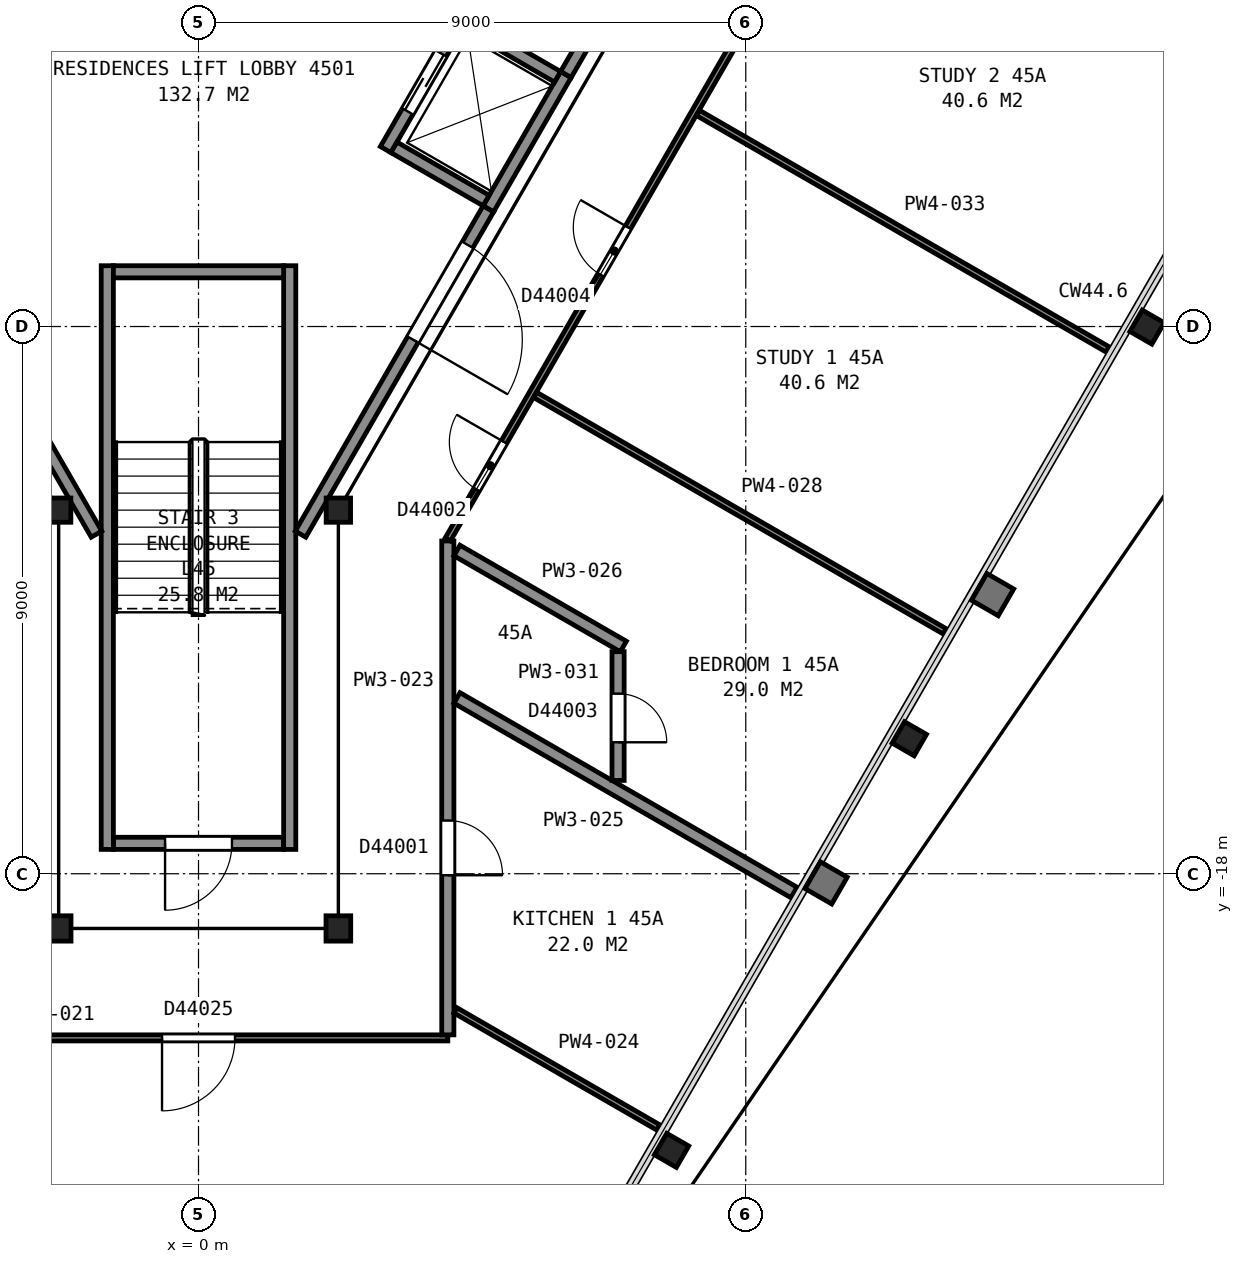
"""IFC4 building model, lengths in metres.
Left out: names, types, materials, properties, quantities, classifications, styles, units other than length and angle.
Written with IfcOpenShell. Run it as: python <this file> out.ifc"""

import sys

from ifc_helpers import new_model, si_unit, direction, frame, frame_2d, origin, origin_2d, place, context, subcontext, project, spatial, rectangle, i_section, extrude, element, fill, save


model = new_model("IFC4")
c1 = context("Model", 3, precision=1e-05, world=origin(), true_north=direction((0.0, 1.0)))
c2 = subcontext(c1, "Body", "Model", "MODEL_VIEW")
j1 = project(units=[si_unit("LENGTHUNIT", "METRE"), si_unit("PLANEANGLEUNIT", "RADIAN")], contexts=[c1])
p1 = place(None, origin())
s1 = spatial("IfcSite", under=j1, at=p1, CompositionType="ELEMENT")
p2 = place(p1, origin())
s2 = spatial("IfcBuilding", under=s1, at=p2, CompositionType="ELEMENT")
p3 = place(p2, frame((0.0, 0.0, 182.1)))
s3 = spatial("IfcBuildingStorey", under=s2, at=p3, CompositionType="ELEMENT", Elevation=182.1)
p4 = place(p3, frame((7.78, -22.55, 0.0), z_axis=(0.0, 0.0, 1.0), x_axis=(-0.5, -0.866025403784, 0.0)))
e1 = element("IfcColumn", 1, at=p4, inside=s3, PredefinedType="COLUMN", context=c2, shape_type="SweptSolid", body=[
    extrude(i_section(OverallWidth=0.406, OverallDepth=0.417, WebThickness=0.03, FlangeThickness=0.048, FilletRadius=0.015, at=origin_2d()), origin(), (0.0, 0.0, 1.0), 3.66),
])
p5 = place(p3, frame((11.69, -15.78, 0.0), z_axis=(0.0, 0.0, 1.0), x_axis=(-0.5, -0.866025403784, 0.0)))
e2 = element("IfcColumn", 2, at=p5, inside=s3, PredefinedType="COLUMN", context=c2, shape_type="SweptSolid", body=[
    extrude(i_section(OverallWidth=0.406, OverallDepth=0.417, WebThickness=0.03, FlangeThickness=0.048, FilletRadius=0.015, at=origin_2d()), origin(), (0.0, 0.0, 1.0), 3.665),
])
p6 = place(p3, frame((15.6, -9.01, 0.0), z_axis=(0.0, 0.0, 1.0), x_axis=(-0.5, -0.866025403784, 0.0)))
e3 = element("IfcColumn", 3, at=p6, inside=s3, PredefinedType="COLUMN", context=c2, shape_type="SweptSolid", body=[
    extrude(i_section(OverallWidth=0.406, OverallDepth=0.417, WebThickness=0.03, FlangeThickness=0.048, FilletRadius=0.015, at=origin_2d()), origin(), (0.0, 0.0, 1.0), 3.67),
])
p7 = place(p3, frame((-2.3, -12.02, 0.0), z_axis=(0.0, 0.0, 1.0), x_axis=(1.0, 0.0, 0.0)))
e4 = element("IfcColumn", 4, at=p7, inside=s3, PredefinedType="COLUMN", context=c2, shape_type="SweptSolid", body=[
    extrude(i_section(OverallWidth=0.401, OverallDepth=0.399, WebThickness=0.025, FlangeThickness=0.04, FilletRadius=0.015, at=origin_2d()), origin(), (0.0, 0.0, 1.0), 3.7),
])
for number, where, z_axis, x_axis in (
    (5, (-2.3, -18.9, 0.0), (0.0, 0.0, 1.0), (-1.0, 0.0, 0.0)),
    (6, (2.3, -18.9, 0.0), (0.0, 0.0, 1.0), (-1.0, 0.0, 0.0)),
):
    element("IfcColumn", number, at=place(p3, frame(where, z_axis=z_axis, x_axis=x_axis)), inside=s3, PredefinedType="COLUMN", context=c2, shape_type="SweptSolid", body=[
        extrude(i_section(OverallWidth=0.406, OverallDepth=0.417, WebThickness=0.03, FlangeThickness=0.048, FilletRadius=0.015, at=origin_2d()), origin(), (0.0, 0.0, 1.0), 3.7),
    ])
p8 = place(p3, frame((2.3, -12.02, 0.0), z_axis=(0.0, 0.0, 1.0), x_axis=(1.0, 0.0, 0.0)))
e7 = element("IfcColumn", 7, at=p8, inside=s3, PredefinedType="COLUMN", context=c2, shape_type="SweptSolid", body=[
    extrude(i_section(OverallWidth=0.401, OverallDepth=0.399, WebThickness=0.025, FlangeThickness=0.04, FilletRadius=0.015, at=origin_2d()), origin(), (0.0, 0.0, 1.0), 3.7),
])
p9 = place(p3, frame((-1.4, -17.5, 0.0), z_axis=(0.0, 0.0, 1.0), x_axis=(1.0, 0.0, 0.0)))
e8 = element("IfcWall", 8, at=p9, inside=s3, PredefinedType="PARTITIONING", context=c2, shape_type="SweptSolid", body=[
    extrude(rectangle(XDim=2.8, YDim=0.2, at=frame_2d((1.4, 0.0))), origin(), (0.0, 0.0, 1.0), 3.45),
])
p10 = place(p9, frame((0.85, 0.0, 0.0)))
e9 = element("IfcOpeningElement", 9, at=p10, cuts=e8, PredefinedType="OPENING", context=c2, shape_type="SweptSolid", body=[
    extrude(rectangle(XDim=1.1, YDim=2.1, at=frame_2d((0.55, 1.05))), frame((0.0, 0.11, 0.0), z_axis=(0.0, -1.0, 0.0), x_axis=(1.0, 0.0, 0.0)), (0.0, 0.0, 1.0), 0.22),
])
for number, where, z_axis, x_axis in (
    (10, (1.5, -8.0, 0.0), (0.0, 0.0, 1.0), (0.0, -1.0, 0.0)),
    (11, (-1.5, -8.0, 0.0), (0.0, 0.0, 1.0), (0.0, -1.0, 0.0)),
):
    element("IfcWall", number, at=place(p3, frame(where, z_axis=z_axis, x_axis=x_axis)), inside=s3, PredefinedType="PARTITIONING", context=c2, shape_type="SweptSolid", body=[
        extrude(rectangle(XDim=9.6, YDim=0.2, at=frame_2d((4.8, 0.0))), origin(), (0.0, 0.0, 1.0), 3.45),
    ])
p11 = place(p3, frame((-1.4, -8.1, 0.0), z_axis=(0.0, 0.0, 1.0), x_axis=(1.0, 0.0, 0.0)))
e12 = element("IfcWall", 12, at=p11, inside=s3, PredefinedType="PARTITIONING", context=c2, shape_type="SweptSolid", body=[
    extrude(rectangle(XDim=2.8, YDim=0.2, at=frame_2d((1.4, 0.0))), origin(), (0.0, 0.0, 1.0), 3.45),
])
p12 = place(p3, frame((4.766, -7.065, 0.0), z_axis=(0.0, 0.0, 1.0), x_axis=(0.499948979701, 0.866054858364, 0.0)))
e13 = element("IfcWall", 13, at=p12, inside=s3, PredefinedType="PARTITIONING", context=c2, shape_type="SweptSolid", body=[
    extrude(rectangle(XDim=2.55, YDim=0.2, at=frame_2d((1.275, 0.0))), origin(), (0.0, 0.0, 1.0), 3.7),
])
p13 = place(p3, frame((3.077, -6.09, 0.0), z_axis=(0.0, 0.0, 1.0), x_axis=(0.500062241894, 0.865989465428, 0.0)))
e14 = element("IfcWall", 14, at=p13, inside=s3, PredefinedType="PARTITIONING", context=c2, shape_type="SweptSolid", body=[
    extrude(rectangle(XDim=2.55, YDim=0.2, at=frame_2d((1.275, 0.0))), origin(), (0.0, 0.0, 1.0), 3.7),
])
p14 = place(p13, frame((0.725, 0.0, 0.0)))
e15 = element("IfcOpeningElement", 15, at=p14, cuts=e14, PredefinedType="OPENING", context=c2, shape_type="SweptSolid", body=[
    extrude(rectangle(XDim=1.1, YDim=2.1, at=frame_2d((0.55, 1.05))), frame((0.0, 0.11, 0.0), z_axis=(0.0, -1.0, 0.0), x_axis=(1.0, 0.0, 0.0)), (0.0, 0.0, 1.0), 0.22),
])
p15 = place(p3, frame((5.905, -4.893, 0.0), z_axis=(0.0, 0.0, 1.0), x_axis=(-0.866002029911, 0.500040482552, 0.0)))
e16 = element("IfcWall", 16, at=p15, inside=s3, PredefinedType="PARTITIONING", context=c2, shape_type="SweptSolid", body=[
    extrude(rectangle(XDim=1.75, YDim=0.2, at=frame_2d((0.875, 0.0))), origin(), (0.0, 0.0, 1.0), 3.7),
])
p16 = place(p3, frame((4.73, -6.928, 0.0), z_axis=(0.0, 0.0, 1.0), x_axis=(-0.866036909293, 0.499980071345, 0.0)))
e17 = element("IfcWall", 17, at=p16, inside=s3, PredefinedType="PARTITIONING", context=c2, shape_type="SweptSolid", body=[
    extrude(rectangle(XDim=1.75, YDim=0.2, at=frame_2d((0.875, 0.0))), origin(), (0.0, 0.0, 1.0), 3.7),
])
p17 = place(p3, frame((-4.655, -7.257, 0.0), z_axis=(0.0, 0.0, 1.0), x_axis=(0.499966124405, -0.866044960985, 0.0)))
e18 = element("IfcWall", 18, at=p17, inside=s3, PredefinedType="PARTITIONING", context=c2, shape_type="SweptSolid", body=[
    extrude(rectangle(XDim=5.956, YDim=0.2, at=frame_2d((2.978, 0.0))), origin(), (0.0, 0.0, 1.0), 3.45),
])
p18 = place(p3, frame((1.677, -12.415, 0.0), z_axis=(0.0, 0.0, 1.0), x_axis=(0.500054337157, 0.865994029939, 0.0)))
e19 = element("IfcWall", 19, at=p18, inside=s3, PredefinedType="PARTITIONING", context=c2, shape_type="SweptSolid", body=[
    extrude(rectangle(XDim=6.177, YDim=0.2, at=frame_2d((3.088, 0.0))), origin(), (0.0, 0.0, 1.0), 3.45),
])
p19 = place(p18, frame((3.695, 0.0, 0.0)))
e20 = element("IfcOpeningElement", 20, at=p19, cuts=e19, PredefinedType="OPENING", context=c2, shape_type="SweptSolid", body=[
    extrude(rectangle(XDim=1.8, YDim=2.1, at=frame_2d((0.9, 1.05))), frame((0.0, 0.11, 0.0), z_axis=(0.0, -1.0, 0.0), x_axis=(1.0, 0.0, 0.0)), (0.0, 0.0, 1.0), 0.22),
])
p20 = place(p3, frame((6.042, -4.855, 0.0), z_axis=(0.0, 0.0, 1.0), x_axis=(0.500252727967, 0.865879442048, 0.0)))
e21 = element("IfcWall", 21, at=p20, inside=s3, PredefinedType="PARTITIONING", context=c2, shape_type="SweptSolid", body=[
    extrude(rectangle(XDim=2.617, YDim=0.2, at=frame_2d((1.309, 0.0))), origin(), (0.0, 0.0, 1.0), 3.45),
])
p21 = place(p3, frame((4.1, -20.7, 0.0), z_axis=(0.0, 0.0, 1.0), x_axis=(-1.0, 0.0, 0.0)))
e22 = element("IfcWall", 22, at=p21, inside=s3, PredefinedType="PARTITIONING", context=c2, shape_type="SweptSolid", body=[
    extrude(rectangle(XDim=8.25, YDim=0.1, at=frame_2d((4.125, 0.0))), origin(), (0.0, 0.0, 1.0), 2.713),
])
p22 = place(p21, frame((3.5, 0.0, 0.0)))
e23 = element("IfcOpeningElement", 23, at=p22, cuts=e22, PredefinedType="OPENING", context=c2, shape_type="SweptSolid", body=[
    extrude(rectangle(XDim=1.2, YDim=2.1, at=frame_2d((0.6, 1.05))), frame((0.0, 0.06, 0.0), z_axis=(0.0, -1.0, 0.0), x_axis=(1.0, 0.0, 0.0)), (0.0, 0.0, 1.0), 0.12),
])
p23 = place(p3, frame((4.1, -12.527, 0.0), z_axis=(0.0, 0.0, 1.0), x_axis=(0.0, -1.0, 0.0)))
e24 = element("IfcWall", 24, at=p23, inside=s3, PredefinedType="PARTITIONING", context=c2, shape_type="SweptSolid", body=[
    extrude(rectangle(XDim=8.123, YDim=0.2, at=frame_2d((4.062, 0.0))), origin(), (0.0, 0.0, 1.0), 2.713),
])
p24 = place(p23, frame((4.598, 0.0, 0.0)))
e25 = element("IfcOpeningElement", 25, at=p24, cuts=e24, PredefinedType="OPENING", context=c2, shape_type="SweptSolid", body=[
    extrude(rectangle(XDim=0.9, YDim=2.1, at=frame_2d((0.45, 1.05))), frame((0.0, 0.11, 0.0), z_axis=(0.0, -1.0, 0.0), x_axis=(1.0, 0.0, 0.0)), (0.0, 0.0, 1.0), 0.22),
])
p25 = place(p3, frame((4.225, -20.247, 0.0), z_axis=(0.0, 0.0, 1.0), x_axis=(0.866070569679, -0.499921762215, 0.0)))
e26 = element("IfcWall", 26, at=p25, inside=s3, PredefinedType="PARTITIONING", context=c2, shape_type="SweptSolid", body=[
    extrude(rectangle(XDim=3.853, YDim=0.1, at=frame_2d((1.926, 0.0))), origin(), (0.0, 0.0, 1.0), 2.713),
])
p26 = place(p3, frame((4.25, -15.109, 0.0), z_axis=(0.0, 0.0, 1.0), x_axis=(0.866077604108, -0.499909575486, 0.0)))
e27 = element("IfcWall", 27, at=p26, inside=s3, PredefinedType="PARTITIONING", context=c2, shape_type="SweptSolid", body=[
    extrude(rectangle(XDim=6.4, YDim=0.2, at=frame_2d((3.2, 0.0))), origin(), (0.0, 0.0, 1.0), 2.713),
])
p27 = place(p3, frame((4.25, -12.684, 0.0), z_axis=(0.0, 0.0, 1.0), x_axis=(0.866109679077, -0.499854002494, 0.0)))
e28 = element("IfcWall", 28, at=p27, inside=s3, PredefinedType="PARTITIONING", context=c2, shape_type="SweptSolid", body=[
    extrude(rectangle(XDim=3.16, YDim=0.2, at=frame_2d((1.58, 0.0))), origin(), (0.0, 0.0, 1.0), 2.713),
])
p28 = place(p3, frame((12.903, 2.745, 0.0), z_axis=(0.0, 0.0, 1.0), x_axis=(-0.499997333799, -0.866026943111, 0.0)))
e29 = element("IfcWall", 29, at=p28, inside=s3, PredefinedType="PARTITIONING", context=c2, shape_type="SweptSolid", body=[
    extrude(rectangle(XDim=17.606, YDim=0.1, at=frame_2d((8.803, 0.0))), origin(), (0.0, 0.0, 1.0), 2.713),
])
p29 = place(p28, frame((15.756, 0.0, 0.0)))
e30 = element("IfcOpeningElement", 30, at=p29, cuts=e29, PredefinedType="OPENING", context=c2, shape_type="SweptSolid", body=[
    extrude(rectangle(XDim=0.9, YDim=2.1, at=frame_2d((0.45, 1.05))), frame((0.0, 0.06, 0.0), z_axis=(0.0, -1.0, 0.0), x_axis=(1.0, 0.0, 0.0)), (0.0, 0.0, 1.0), 0.12),
])
p30 = place(p28, frame((11.679, 0.0, 0.0)))
e31 = element("IfcOpeningElement", 31, at=p30, cuts=e29, PredefinedType="OPENING", context=c2, shape_type="SweptSolid", body=[
    extrude(rectangle(XDim=0.9, YDim=2.1, at=frame_2d((0.45, 1.05))), frame((0.0, 0.06, 0.0), z_axis=(0.0, -1.0, 0.0), x_axis=(1.0, 0.0, 0.0)), (0.0, 0.0, 1.0), 0.12),
])
p31 = place(p28, frame((6.324, 0.0, 0.0)))
e32 = element("IfcOpeningElement", 32, at=p31, cuts=e29, PredefinedType="OPENING", context=c2, shape_type="SweptSolid", body=[
    extrude(rectangle(XDim=0.9, YDim=2.1, at=frame_2d((0.45, 1.05))), frame((0.0, 0.06, 0.0), z_axis=(0.0, -1.0, 0.0), x_axis=(1.0, 0.0, 0.0)), (0.0, 0.0, 1.0), 0.12),
])
p32 = place(p3, frame((5.536, -10.125, 0.0), z_axis=(0.0, 0.0, 1.0), x_axis=(0.866044474677, -0.49996696679, 0.0)))
e33 = element("IfcWall", 33, at=p32, inside=s3, PredefinedType="PARTITIONING", context=c2, shape_type="SweptSolid", body=[
    extrude(rectangle(XDim=7.779, YDim=0.1, at=frame_2d((3.889, 0.0))), origin(), (0.0, 0.0, 1.0), 2.713),
])
p33 = place(p3, frame((6.9, -16.465, 0.0), z_axis=(0.0, 0.0, 1.0), x_axis=(0.0, 1.0, 0.0)))
e34 = element("IfcWall", 34, at=p33, inside=s3, PredefinedType="PARTITIONING", context=c2, shape_type="SweptSolid", body=[
    extrude(rectangle(XDim=2.117, YDim=0.2, at=frame_2d((1.059, 0.0))), origin(), (0.0, 0.0, 1.0), 2.713),
])
p34 = place(p33, frame((0.627, 0.0, 0.0)))
e35 = element("IfcOpeningElement", 35, at=p34, cuts=e34, PredefinedType="OPENING", context=c2, shape_type="SweptSolid", body=[
    extrude(rectangle(XDim=0.8, YDim=2.1, at=frame_2d((0.4, 1.05))), frame((0.0, 0.11, 0.0), z_axis=(0.0, -1.0, 0.0), x_axis=(1.0, 0.0, 0.0)), (0.0, 0.0, 1.0), 0.22),
])
p35 = place(p3, frame((8.214, -5.487, 0.0), z_axis=(0.0, 0.0, 1.0), x_axis=(0.866007344409, -0.500031278452, 0.0)))
e36 = element("IfcWall", 36, at=p35, inside=s3, PredefinedType="PARTITIONING", context=c2, shape_type="SweptSolid", body=[
    extrude(rectangle(XDim=7.778, YDim=0.1, at=frame_2d((3.889, 0.0))), origin(), (0.0, 0.0, 1.0), 2.713),
])
p36 = place(p3, frame((10.887, -0.846, 0.0), z_axis=(0.0, 0.0, 1.0), x_axis=(0.866004841997, -0.500035612369, 0.0)))
e37 = element("IfcWall", 37, at=p36, inside=s3, PredefinedType="PARTITIONING", context=c2, shape_type="SweptSolid", body=[
    extrude(rectangle(XDim=7.783, YDim=0.1, at=frame_2d((3.892, 0.0))), origin(), (0.0, 0.0, 1.0), 2.713),
])
p37 = place(p10, origin())
e38 = element("IfcDoor", 38, at=p37, inside=s3, OperationType="SINGLE_SWING_LEFT", PredefinedType="DOOR", context=c2, shape_type="SweptSolid", body=[
    extrude(rectangle(XDim=1.1, YDim=2.1, at=frame_2d((0.55, 1.05))), frame((0.0, 0.025, 0.0), z_axis=(0.0, -1.0, 0.0), x_axis=(1.0, 0.0, 0.0)), (0.0, 0.0, 1.0), 0.05),
])
fill(e9, e38)
p38 = place(p14, origin())
e39 = element("IfcDoor", 39, at=p38, inside=s3, OperationType="SLIDING_TO_LEFT", PredefinedType="DOOR", context=c2, shape_type="SweptSolid", body=[
    extrude(rectangle(XDim=1.1, YDim=2.1, at=frame_2d((0.55, 1.05))), frame((0.0, 0.025, 0.0), z_axis=(0.0, -1.0, 0.0), x_axis=(1.0, 0.0, 0.0)), (0.0, 0.0, 1.0), 0.05),
])
fill(e15, e39)
p39 = place(p19, origin())
e40 = element("IfcDoor", 40, at=p39, inside=s3, OperationType="DOUBLE_DOOR_SINGLE_SWING", PredefinedType="DOOR", context=c2, shape_type="SweptSolid", body=[
    extrude(rectangle(XDim=1.8, YDim=2.1, at=frame_2d((0.9, 1.05))), frame((0.0, 0.025, 0.0), z_axis=(0.0, -1.0, 0.0), x_axis=(1.0, 0.0, 0.0)), (0.0, 0.0, 1.0), 0.05),
])
fill(e20, e40)
p40 = place(p22, origin())
e41 = element("IfcDoor", 41, at=p40, inside=s3, OperationType="SINGLE_SWING_RIGHT", PredefinedType="DOOR", context=c2, shape_type="SweptSolid", body=[
    extrude(rectangle(XDim=1.2, YDim=2.1, at=frame_2d((0.6, 1.05))), frame((0.0, 0.025, 0.0), z_axis=(0.0, -1.0, 0.0), x_axis=(1.0, 0.0, 0.0)), (0.0, 0.0, 1.0), 0.05),
])
fill(e23, e41)
p41 = place(p24, origin())
e42 = element("IfcDoor", 42, at=p41, inside=s3, OperationType="SINGLE_SWING_RIGHT", PredefinedType="DOOR", context=c2, shape_type="SweptSolid", body=[
    extrude(rectangle(XDim=0.9, YDim=2.1, at=frame_2d((0.45, 1.05))), frame((0.0, 0.025, 0.0), z_axis=(0.0, -1.0, 0.0), x_axis=(1.0, 0.0, 0.0)), (0.0, 0.0, 1.0), 0.05),
])
fill(e25, e42)
p42 = place(p29, origin())
e43 = element("IfcDoor", 43, at=p42, inside=s3, OperationType="SINGLE_SWING_LEFT", PredefinedType="DOOR", context=c2, shape_type="SweptSolid", body=[
    extrude(rectangle(XDim=0.9, YDim=2.1, at=frame_2d((0.45, 1.05))), frame((0.0, 0.025, 0.0), z_axis=(0.0, -1.0, 0.0), x_axis=(1.0, 0.0, 0.0)), (0.0, 0.0, 1.0), 0.05),
])
fill(e30, e43)
p43 = place(p30, origin())
e44 = element("IfcDoor", 44, at=p43, inside=s3, OperationType="SINGLE_SWING_LEFT", PredefinedType="DOOR", context=c2, shape_type="SweptSolid", body=[
    extrude(rectangle(XDim=0.9, YDim=2.1, at=frame_2d((0.45, 1.05))), frame((0.0, 0.025, 0.0), z_axis=(0.0, -1.0, 0.0), x_axis=(1.0, 0.0, 0.0)), (0.0, 0.0, 1.0), 0.05),
])
fill(e31, e44)
p44 = place(p34, origin())
e45 = element("IfcDoor", 45, at=p44, inside=s3, OperationType="SINGLE_SWING_LEFT", PredefinedType="DOOR", context=c2, shape_type="SweptSolid", body=[
    extrude(rectangle(XDim=0.8, YDim=2.1, at=frame_2d((0.4, 1.05))), frame((0.0, 0.025, 0.0), z_axis=(0.0, -1.0, 0.0), x_axis=(1.0, 0.0, 0.0)), (0.0, 0.0, 1.0), 0.05),
])
fill(e35, e45)
save(model, sys.argv[1])
